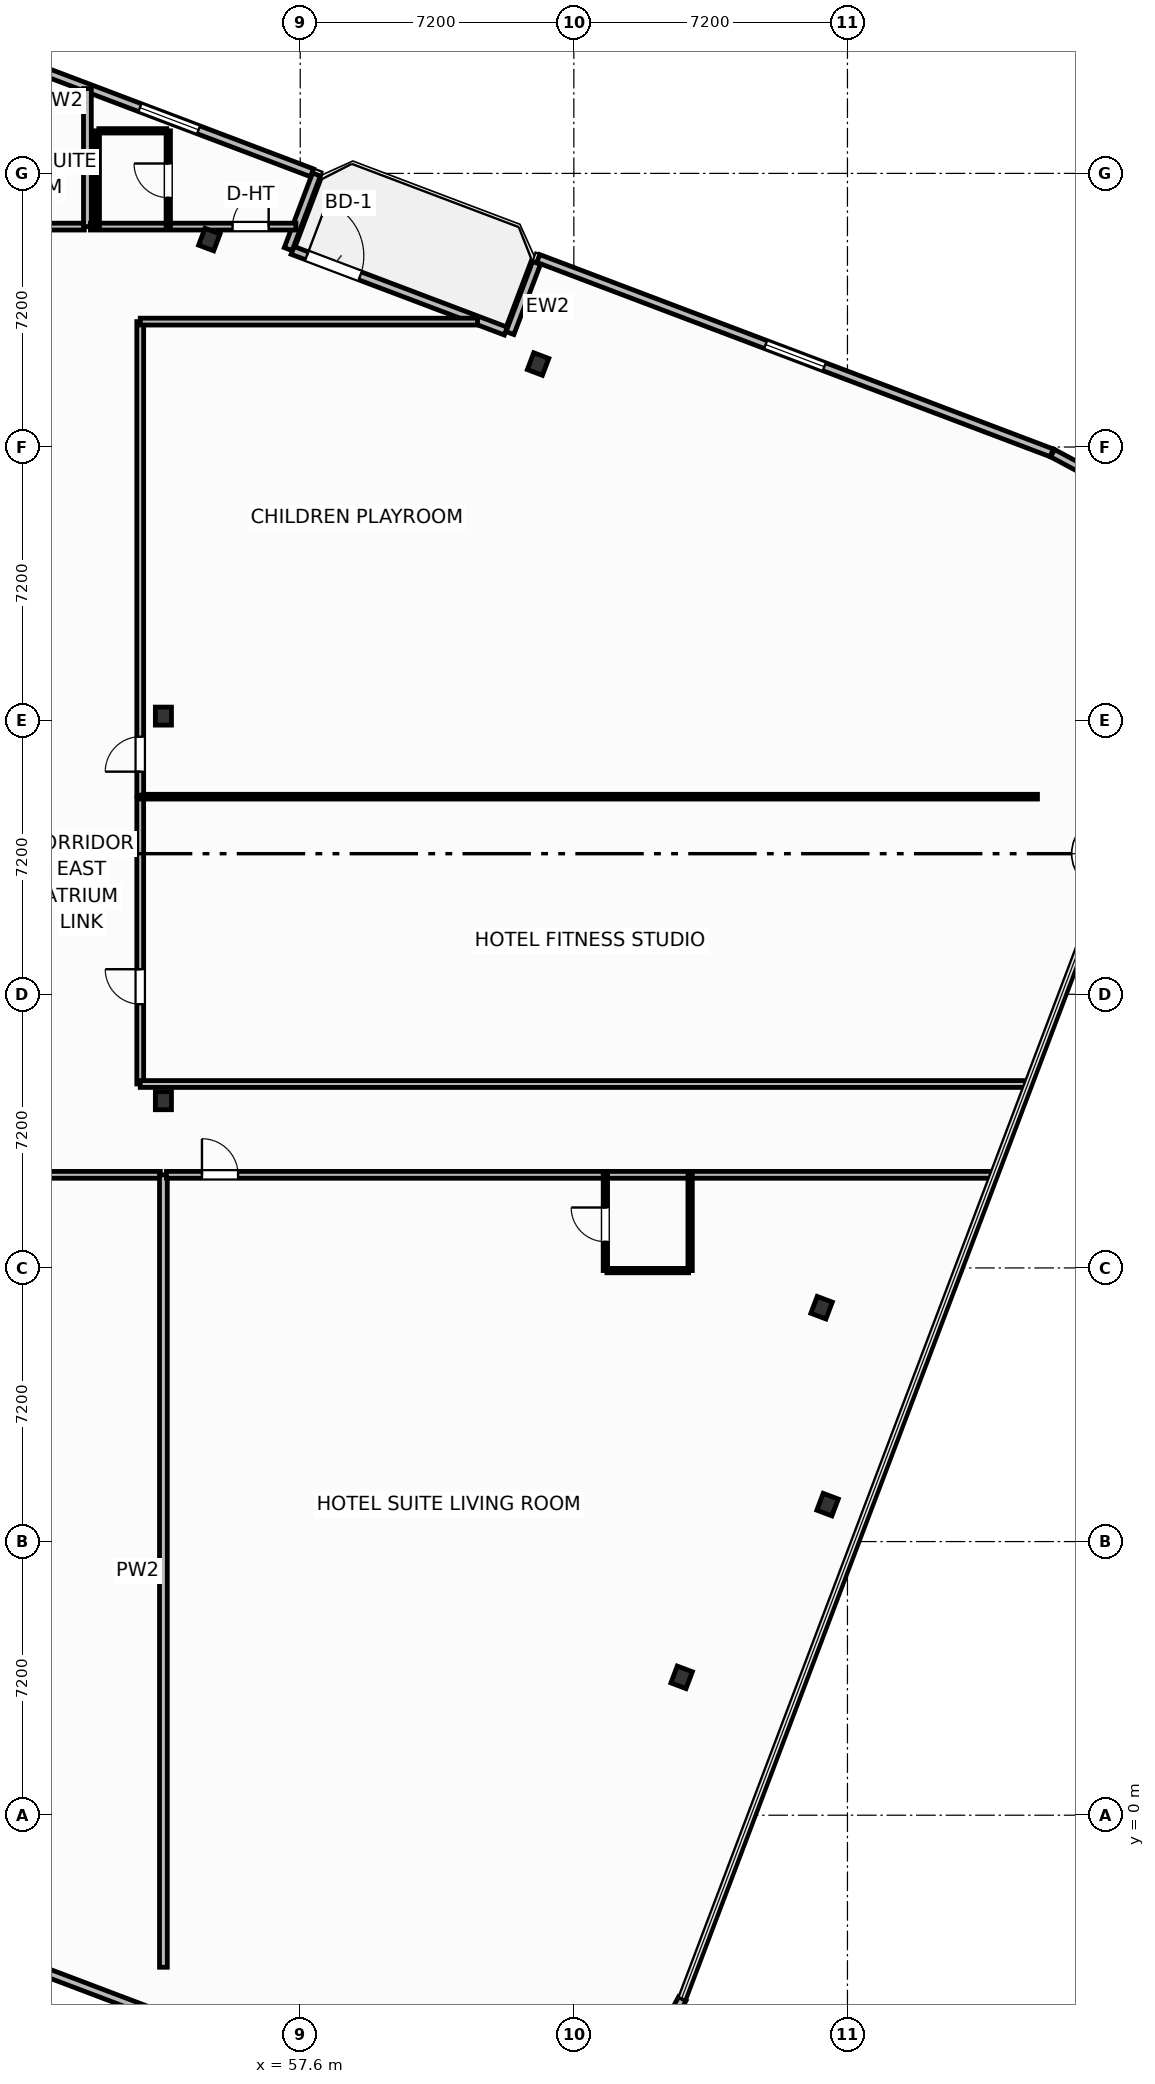
"""IFC4 building model, lengths in metres.
Left out: names, types, materials, properties, quantities, classifications, styles, units other than length and angle.
Written with IfcOpenShell. Run it as: python <this file> out.ifc"""

import sys

from ifc_helpers import new_model, si_unit, direction, frame, frame_2d, origin, origin_2d, place, context, subcontext, project, spatial, rectangle, i_section, extrude, element, fill, save


model = new_model("IFC4")
c1 = context("Model", 3, precision=1e-05, world=origin(), true_north=direction((0.0, 1.0)))
c2 = subcontext(c1, "Body", "Model", "MODEL_VIEW")
j1 = project(units=[si_unit("LENGTHUNIT", "METRE"), si_unit("PLANEANGLEUNIT", "RADIAN")], contexts=[c1])
p1 = place(None, origin())
s1 = spatial("IfcSite", under=j1, at=p1, CompositionType="ELEMENT")
p2 = place(p1, origin())
s2 = spatial("IfcBuilding", under=s1, at=p2, CompositionType="ELEMENT")
p3 = place(p2, frame((0.0, 0.0, 102.1)))
s3 = spatial("IfcBuildingStorey", under=s2, at=p3, CompositionType="ELEMENT", Elevation=102.1)
for number, where, z_axis, x_axis in (
    (1, (54.0, 18.8, 0.0), (0.0, 0.0, 1.0), (1.0, 0.0, 0.0)),
    (2, (54.0, 28.92, 0.0), (0.0, 0.0, 1.0), (1.0, 0.0, 0.0)),
    (3, (67.637, 3.628, 0.0), (0.0, 0.0, 1.0), (0.935, -0.354, 0.0)),
    (4, (71.477, 8.173, 0.0), (0.0, 0.0, 1.0), (0.935, -0.354, 0.0)),
    (5, (71.319, 13.354, 0.0), (0.0, 0.0, 1.0), (0.935, -0.354, 0.0)),
    (6, (63.859, 38.184, 0.0), (0.0, 0.0, 1.0), (0.935, -0.354, 0.0)),
    (7, (55.208, 41.459, 0.0), (0.0, 0.0, 1.0), (0.935, -0.354, 0.0)),
):
    element("IfcColumn", number, at=place(p3, frame(where, z_axis=z_axis, x_axis=x_axis)), inside=s3, PredefinedType="COLUMN", context=c2, shape_type="SweptSolid", body=[
        extrude(i_section(OverallWidth=0.424, OverallDepth=0.474, WebThickness=0.048, FlangeThickness=0.077, FilletRadius=0.025, at=origin_2d()), origin(), (0.0, 0.0, 1.0), 3.7),
    ])
p4 = place(p3, frame((57.399, 41.175, 0.0), z_axis=(0.0, 0.0, 1.0), x_axis=(0.935227640088, -0.354046976001, 0.0)))
e8 = element("IfcWall", 8, at=p4, inside=s3, PredefinedType="SOLIDWALL", context=c2, shape_type="SweptSolid", body=[
    extrude(rectangle(XDim=6.0, YDim=0.22, at=frame_2d((3.0, 0.0))), origin(), (0.0, 0.0, 1.0), 2.73),
])
p5 = place(p4, frame((0.4, 0.0, 0.0)))
e9 = element("IfcOpeningElement", 9, at=p5, cuts=e8, PredefinedType="OPENING", context=c2, shape_type="SweptSolid", body=[
    extrude(rectangle(XDim=1.5, YDim=2.25, at=frame_2d((0.75, 1.125))), frame((0.0, 0.12, 0.0), z_axis=(0.0, -1.0, 0.0), x_axis=(1.0, 0.0, 0.0)), (0.0, 0.0, 1.0), 0.24),
])
p6 = place(p3, frame((47.424, -2.813, 0.0), z_axis=(0.0, 0.0, 1.0), x_axis=(0.935225962032, -0.354051408614, 0.0)))
e10 = element("IfcWall", 10, at=p6, inside=s3, PredefinedType="SOLIDWALL", context=c2, shape_type="SweptSolid", body=[
    extrude(rectangle(XDim=14.347, YDim=0.22, at=frame_2d((7.173, 0.0))), origin(), (0.0, 0.0, 1.0), 2.73),
])
p7 = place(p6, frame((6.348, 0.0, 0.8)))
e11 = element("IfcOpeningElement", 11, at=p7, cuts=e10, PredefinedType="OPENING", context=c2, shape_type="SweptSolid", body=[
    extrude(rectangle(XDim=1.65, YDim=1.65, at=frame_2d((0.825, 0.825))), frame((0.0, 0.12, 0.0), z_axis=(0.0, -1.0, 0.0), x_axis=(1.0, 0.0, 0.0)), (0.0, 0.0, 1.0), 0.24),
])
p8 = place(p3, frame((67.015, -6.019, 0.0), z_axis=(0.0, 0.0, 1.0), x_axis=(0.473077364598, 0.881020889142, 0.0)))
e12 = element("IfcWall", 12, at=p8, inside=s3, PredefinedType="SOLIDWALL", context=c2, shape_type="SweptSolid", body=[
    extrude(rectangle(XDim=1.353, YDim=0.22, at=frame_2d((0.677, 0.0))), origin(), (0.0, 0.0, 1.0), 2.73),
])
p9 = place(p3, frame((78.597, 35.194, 0.0), z_axis=(0.0, 0.0, 1.0), x_axis=(-0.880948732004, 0.473211719614, 0.0)))
e13 = element("IfcWall", 13, at=p9, inside=s3, PredefinedType="SOLIDWALL", context=c2, shape_type="SweptSolid", body=[
    extrude(rectangle(XDim=1.361, YDim=0.22, at=frame_2d((0.681, 0.0))), origin(), (0.0, 0.0, 1.0), 2.73),
])
p10 = place(p3, frame((77.375, 35.847, 0.0), z_axis=(0.0, 0.0, 1.0), x_axis=(-0.935222448475, 0.354060689526, 0.0)))
e14 = element("IfcWall", 14, at=p10, inside=s3, PredefinedType="SOLIDWALL", context=c2, shape_type="SweptSolid", body=[
    extrude(rectangle(XDim=14.447, YDim=0.22, at=frame_2d((7.224, 0.0))), origin(), (0.0, 0.0, 1.0), 2.73),
])
p11 = place(p10, frame((6.399, 0.0, 0.8)))
e15 = element("IfcOpeningElement", 15, at=p11, cuts=e14, PredefinedType="OPENING", context=c2, shape_type="SweptSolid", body=[
    extrude(rectangle(XDim=1.65, YDim=1.65, at=frame_2d((0.825, 0.825))), frame((0.0, 0.12, 0.0), z_axis=(0.0, -1.0, 0.0), x_axis=(1.0, 0.0, 0.0)), (0.0, 0.0, 1.0), 0.24),
])
p12 = place(p3, frame((63.819, 40.845, 0.0), z_axis=(0.0, 0.0, 1.0), x_axis=(-0.354128791944, -0.935196663123, 0.0)))
e16 = element("IfcWall", 16, at=p12, inside=s3, PredefinedType="SOLIDWALL", context=c2, shape_type="SweptSolid", body=[
    extrude(rectangle(XDim=1.975, YDim=0.22, at=frame_2d((0.988, 0.0))), origin(), (0.0, 0.0, 1.0), 2.73),
])
p13 = place(p3, frame((57.284, 41.208, 0.0), z_axis=(0.0, 0.0, 1.0), x_axis=(0.354128469405, 0.935196785258, 0.0)))
e17 = element("IfcWall", 17, at=p13, inside=s3, PredefinedType="SOLIDWALL", context=c2, shape_type="SweptSolid", body=[
    extrude(rectangle(XDim=2.1, YDim=0.22, at=frame_2d((1.05, 0.0))), origin(), (0.0, 0.0, 1.0), 2.73),
])
p14 = place(p3, frame((57.91, 43.216, 0.0), z_axis=(0.0, 0.0, 1.0), x_axis=(-0.935220736163, 0.354065212427, 0.0)))
e18 = element("IfcWall", 18, at=p14, inside=s3, PredefinedType="SOLIDWALL", context=c2, shape_type="SweptSolid", body=[
    extrude(rectangle(XDim=8.035, YDim=0.22, at=frame_2d((4.018, 0.0))), origin(), (0.0, 0.0, 1.0), 2.73),
])
p15 = place(p14, frame((3.192, 0.0, 0.8)))
e19 = element("IfcOpeningElement", 19, at=p15, cuts=e18, PredefinedType="OPENING", context=c2, shape_type="SweptSolid", body=[
    extrude(rectangle(XDim=1.65, YDim=1.65, at=frame_2d((0.825, 0.825))), frame((0.0, 0.12, 0.0), z_axis=(0.0, -1.0, 0.0), x_axis=(1.0, 0.0, 0.0)), (0.0, 0.0, 1.0), 0.24),
])
p16 = place(p3, frame((39.28, 16.85, 0.0), z_axis=(0.0, 0.0, 1.0), x_axis=(1.0, 0.0, 0.0)))
e20 = element("IfcWall", 20, at=p16, inside=s3, PredefinedType="PARTITIONING", context=c2, shape_type="SweptSolid", body=[
    extrude(rectangle(XDim=14.64, YDim=0.18, at=frame_2d((7.32, 0.0))), origin(), (0.0, 0.0, 1.0), 3.45),
])
p17 = place(p16, frame((3.322, 0.0, 0.0)))
e21 = element("IfcOpeningElement", 21, at=p17, cuts=e20, PredefinedType="OPENING", context=c2, shape_type="SweptSolid", body=[
    extrude(rectangle(XDim=0.95, YDim=2.15, at=frame_2d((0.475, 1.075))), frame((0.0, 0.1, 0.0), z_axis=(0.0, -1.0, 0.0), x_axis=(1.0, 0.0, 0.0)), (0.0, 0.0, 1.0), 0.2),
])
p18 = place(p3, frame((54.0, -4.0, 0.0), z_axis=(0.0, 0.0, 1.0), x_axis=(0.0, 1.0, 0.0)))
e22 = element("IfcWall", 22, at=p18, inside=s3, PredefinedType="PARTITIONING", context=c2, shape_type="SweptSolid", body=[
    extrude(rectangle(XDim=20.85, YDim=0.205, at=frame_2d((10.425, 0.0))), origin(), (0.0, 0.0, 1.0), 3.45),
])
p19 = place(p3, frame((54.08, 16.85, 0.0), z_axis=(0.0, 0.0, 1.0), x_axis=(1.0, 0.0, 0.0)))
e23 = element("IfcWall", 23, at=p19, inside=s3, PredefinedType="PARTITIONING", context=c2, shape_type="SweptSolid", body=[
    extrude(rectangle(XDim=21.722, YDim=0.18, at=frame_2d((10.861, 0.0))), origin(), (0.0, 0.0, 1.0), 2.58),
])
p20 = place(p19, frame((0.934, 0.0, 0.0)))
e24 = element("IfcOpeningElement", 24, at=p20, cuts=e23, PredefinedType="OPENING", context=c2, shape_type="SweptSolid", body=[
    extrude(rectangle(XDim=0.95, YDim=2.15, at=frame_2d((0.475, 1.075))), frame((0.0, 0.1, 0.0), z_axis=(0.0, -1.0, 0.0), x_axis=(1.0, 0.0, 0.0)), (0.0, 0.0, 1.0), 0.2),
])
p21 = place(p3, frame((65.67, 14.33, 0.0), z_axis=(0.0, 0.0, 1.0), x_axis=(1.0, 0.0, 0.0)))
e25 = element("IfcWall", 25, at=p21, inside=s3, PredefinedType="PARTITIONING", context=c2, shape_type="SweptSolid", body=[
    extrude(rectangle(XDim=2.15, YDim=0.115, at=frame_2d((1.075, 0.0))), origin(), (0.0, 0.0, 1.0), 2.58),
])
p22 = place(p3, frame((65.63, 14.33, 0.0), z_axis=(0.0, 0.0, 1.0), x_axis=(0.0, 1.0, 0.0)))
e26 = element("IfcWall", 26, at=p22, inside=s3, PredefinedType="PARTITIONING", context=c2, shape_type="SweptSolid", body=[
    extrude(rectangle(XDim=2.52, YDim=0.115, at=frame_2d((1.26, 0.0))), origin(), (0.0, 0.0, 1.0), 3.45),
])
p23 = place(p22, frame((0.76, 0.0, 0.0)))
e27 = element("IfcOpeningElement", 27, at=p23, cuts=e26, PredefinedType="OPENING", context=c2, shape_type="SweptSolid", body=[
    extrude(rectangle(XDim=0.9, YDim=2.05, at=frame_2d((0.45, 1.025))), frame((0.0, 0.067, 0.0), z_axis=(0.0, -1.0, 0.0), x_axis=(1.0, 0.0, 0.0)), (0.0, 0.0, 1.0), 0.135),
])
p24 = place(p3, frame((67.86, 14.33, 0.0), z_axis=(0.0, 0.0, 1.0), x_axis=(0.0, 1.0, 0.0)))
e28 = element("IfcWall", 28, at=p24, inside=s3, PredefinedType="PARTITIONING", context=c2, shape_type="SweptSolid", body=[
    extrude(rectangle(XDim=2.52, YDim=0.115, at=frame_2d((1.26, 0.0))), origin(), (0.0, 0.0, 1.0), 3.45),
])
p25 = place(p3, frame((42.08, 41.8, 0.0), z_axis=(0.0, 0.0, 1.0), x_axis=(1.0, 0.0, 0.0)))
e29 = element("IfcWall", 29, at=p25, inside=s3, PredefinedType="PARTITIONING", context=c2, shape_type="SweptSolid", body=[
    extrude(rectangle(XDim=9.84, YDim=0.18, at=frame_2d((4.92, 0.0))), origin(), (0.0, 0.0, 1.0), 3.45),
])
p26 = place(p25, frame((3.323, 0.0, 0.0)))
e30 = element("IfcOpeningElement", 30, at=p26, cuts=e29, PredefinedType="OPENING", context=c2, shape_type="SweptSolid", body=[
    extrude(rectangle(XDim=0.95, YDim=2.15, at=frame_2d((0.475, 1.075))), frame((0.0, 0.1, 0.0), z_axis=(0.0, -1.0, 0.0), x_axis=(1.0, 0.0, 0.0)), (0.0, 0.0, 1.0), 0.2),
])
p27 = place(p3, frame((52.0, 41.8, 0.0), z_axis=(0.0, 0.0, 1.0), x_axis=(0.0, 1.0, 0.0)))
e31 = element("IfcWall", 31, at=p27, inside=s3, PredefinedType="PARTITIONING", context=c2, shape_type="SweptSolid", body=[
    extrude(rectangle(XDim=3.632, YDim=0.205, at=frame_2d((1.816, 0.0))), origin(), (0.0, 0.0, 1.0), 3.45),
])
p28 = place(p3, frame((52.08, 41.8, 0.0), z_axis=(0.0, 0.0, 1.0), x_axis=(1.0, 0.0, 0.0)))
e32 = element("IfcWall", 32, at=p28, inside=s3, PredefinedType="PARTITIONING", context=c2, shape_type="SweptSolid", body=[
    extrude(rectangle(XDim=5.406, YDim=0.18, at=frame_2d((2.703, 0.0))), origin(), (0.0, 0.0, 1.0), 3.45),
])
p29 = place(p28, frame((3.74, 0.0, 0.0)))
e33 = element("IfcOpeningElement", 33, at=p29, cuts=e32, PredefinedType="OPENING", context=c2, shape_type="SweptSolid", body=[
    extrude(rectangle(XDim=0.95, YDim=2.15, at=frame_2d((0.475, 1.075))), frame((0.0, 0.1, 0.0), z_axis=(0.0, -1.0, 0.0), x_axis=(1.0, 0.0, 0.0)), (0.0, 0.0, 1.0), 0.2),
])
p30 = place(p3, frame((52.3, 44.32, 0.0), z_axis=(0.0, 0.0, 1.0), x_axis=(1.0, 0.0, 0.0)))
e34 = element("IfcWall", 34, at=p30, inside=s3, PredefinedType="PARTITIONING", context=c2, shape_type="SweptSolid", body=[
    extrude(rectangle(XDim=1.788, YDim=0.115, at=frame_2d((0.894, 0.0))), origin(), (0.0, 0.0, 1.0), 3.45),
])
p31 = place(p3, frame((54.128, 41.8, 0.0), z_axis=(0.0, 0.0, 1.0), x_axis=(0.0, 1.0, 0.0)))
e35 = element("IfcWall", 35, at=p31, inside=s3, PredefinedType="PARTITIONING", context=c2, shape_type="SweptSolid", body=[
    extrude(rectangle(XDim=2.52, YDim=0.115, at=frame_2d((1.26, 0.0))), origin(), (0.0, 0.0, 1.0), 3.45),
])
p32 = place(p31, frame((0.76, 0.0, 0.0)))
e36 = element("IfcOpeningElement", 36, at=p32, cuts=e35, PredefinedType="OPENING", context=c2, shape_type="SweptSolid", body=[
    extrude(rectangle(XDim=0.9, YDim=2.05, at=frame_2d((0.45, 1.025))), frame((0.0, 0.067, 0.0), z_axis=(0.0, -1.0, 0.0), x_axis=(1.0, 0.0, 0.0)), (0.0, 0.0, 1.0), 0.135),
])
p33 = place(p3, frame((52.26, 41.8, 0.0), z_axis=(0.0, 0.0, 1.0), x_axis=(0.0, 1.0, 0.0)))
e37 = element("IfcWall", 37, at=p33, inside=s3, PredefinedType="PARTITIONING", context=c2, shape_type="SweptSolid", body=[
    extrude(rectangle(XDim=2.52, YDim=0.115, at=frame_2d((1.26, 0.0))), origin(), (0.0, 0.0, 1.0), 3.45),
])
p34 = place(p3, frame((53.39, 19.24, 0.0), z_axis=(0.0, 0.0, 1.0), x_axis=(0.0, 1.0, 0.0)))
e38 = element("IfcWall", 38, at=p34, inside=s3, PredefinedType="PARTITIONING", context=c2, shape_type="SweptSolid", body=[
    extrude(rectangle(XDim=7.52, YDim=0.18, at=frame_2d((3.76, 0.0))), origin(), (0.0, 0.0, 1.0), 3.45),
])
p35 = place(p34, frame((2.1, 0.0, 0.0)))
e39 = element("IfcOpeningElement", 39, at=p35, cuts=e38, PredefinedType="OPENING", context=c2, shape_type="SweptSolid", body=[
    extrude(rectangle(XDim=0.92, YDim=2.05, at=frame_2d((0.46, 1.025))), frame((0.0, 0.1, 0.0), z_axis=(0.0, -1.0, 0.0), x_axis=(1.0, 0.0, 0.0)), (0.0, 0.0, 1.0), 0.2),
])
p36 = place(p3, frame((53.39, 26.8, 0.0), z_axis=(0.0, 0.0, 1.0), x_axis=(1.0, 0.0, 0.0)))
e40 = element("IfcWall", 40, at=p36, inside=s3, PredefinedType="PARTITIONING", context=c2, shape_type="SweptSolid", body=[
    extrude(rectangle(XDim=23.61, YDim=0.125, at=frame_2d((11.805, 0.0))), origin(), (0.0, 0.0, 1.0), 3.45),
])
p37 = place(p3, frame((53.39, 19.24, 0.0), z_axis=(0.0, 0.0, 1.0), x_axis=(1.0, 0.0, 0.0)))
e41 = element("IfcWall", 41, at=p37, inside=s3, PredefinedType="PARTITIONING", context=c2, shape_type="SweptSolid", body=[
    extrude(rectangle(XDim=23.317, YDim=0.18, at=frame_2d((11.658, 0.0))), origin(), (0.0, 0.0, 1.0), 3.45),
])
p38 = place(p3, frame((53.39, 26.84, 0.0), z_axis=(0.0, 0.0, 1.0), x_axis=(0.0, 1.0, 0.0)))
e42 = element("IfcWall", 42, at=p38, inside=s3, PredefinedType="PARTITIONING", context=c2, shape_type="SweptSolid", body=[
    extrude(rectangle(XDim=12.46, YDim=0.18, at=frame_2d((6.23, 0.0))), origin(), (0.0, 0.0, 1.0), 3.45),
])
p39 = place(p38, frame((0.618, 0.0, 0.0)))
e43 = element("IfcOpeningElement", 43, at=p39, cuts=e42, PredefinedType="OPENING", context=c2, shape_type="SweptSolid", body=[
    extrude(rectangle(XDim=0.92, YDim=2.05, at=frame_2d((0.46, 1.025))), frame((0.0, 0.1, 0.0), z_axis=(0.0, -1.0, 0.0), x_axis=(1.0, 0.0, 0.0)), (0.0, 0.0, 1.0), 0.2),
])
p40 = place(p3, frame((53.39, 39.3, 0.0), z_axis=(0.0, 0.0, 1.0), x_axis=(1.0, 0.0, 0.0)))
e44 = element("IfcWall", 44, at=p40, inside=s3, PredefinedType="PARTITIONING", context=c2, shape_type="SweptSolid", body=[
    extrude(rectangle(XDim=8.876, YDim=0.18, at=frame_2d((4.438, 0.0))), origin(), (0.0, 0.0, 1.0), 3.45),
])
p41 = place(p5, origin())
e45 = element("IfcDoor", 45, at=p41, inside=s3, OperationType="SINGLE_SWING_LEFT", PredefinedType="DOOR", context=c2, shape_type="SweptSolid", body=[
    extrude(rectangle(XDim=1.5, YDim=2.25, at=frame_2d((0.75, 1.125))), frame((0.0, 0.025, 0.0), z_axis=(0.0, -1.0, 0.0), x_axis=(1.0, 0.0, 0.0)), (0.0, 0.0, 1.0), 0.05),
])
fill(e9, e45)
p42 = place(p11, origin())
e46 = element("IfcWindow", 46, at=p42, inside=s3, PartitioningType="SINGLE_PANEL", PredefinedType="WINDOW", context=c2, shape_type="SweptSolid", body=[
    extrude(rectangle(XDim=1.65, YDim=1.65, at=frame_2d((0.825, 0.825))), frame((0.0, 0.03, 0.0), z_axis=(0.0, -1.0, 0.0), x_axis=(1.0, 0.0, 0.0)), (0.0, 0.0, 1.0), 0.06),
])
fill(e15, e46)
p43 = place(p15, origin())
e47 = element("IfcWindow", 47, at=p43, inside=s3, PartitioningType="SINGLE_PANEL", PredefinedType="WINDOW", context=c2, shape_type="SweptSolid", body=[
    extrude(rectangle(XDim=1.65, YDim=1.65, at=frame_2d((0.825, 0.825))), frame((0.0, 0.03, 0.0), z_axis=(0.0, -1.0, 0.0), x_axis=(1.0, 0.0, 0.0)), (0.0, 0.0, 1.0), 0.06),
])
fill(e19, e47)
p44 = place(p20, origin())
e48 = element("IfcDoor", 48, at=p44, inside=s3, OperationType="SINGLE_SWING_LEFT", PredefinedType="DOOR", context=c2, shape_type="SweptSolid", body=[
    extrude(rectangle(XDim=0.95, YDim=2.15, at=frame_2d((0.475, 1.075))), frame((0.0, 0.025, 0.0), z_axis=(0.0, -1.0, 0.0), x_axis=(1.0, 0.0, 0.0)), (0.0, 0.0, 1.0), 0.05),
])
fill(e24, e48)
p45 = place(p23, origin())
e49 = element("IfcDoor", 49, at=p45, inside=s3, OperationType="SINGLE_SWING_RIGHT", PredefinedType="DOOR", context=c2, shape_type="SweptSolid", body=[
    extrude(rectangle(XDim=0.9, YDim=2.05, at=frame_2d((0.45, 1.025))), frame((0.0, 0.025, 0.0), z_axis=(0.0, -1.0, 0.0), x_axis=(1.0, 0.0, 0.0)), (0.0, 0.0, 1.0), 0.05),
])
fill(e27, e49)
p46 = place(p29, origin())
e50 = element("IfcDoor", 50, at=p46, inside=s3, OperationType="SINGLE_SWING_RIGHT", PredefinedType="DOOR", context=c2, shape_type="SweptSolid", body=[
    extrude(rectangle(XDim=0.95, YDim=2.15, at=frame_2d((0.475, 1.075))), frame((0.0, 0.025, 0.0), z_axis=(0.0, -1.0, 0.0), x_axis=(1.0, 0.0, 0.0)), (0.0, 0.0, 1.0), 0.05),
])
fill(e33, e50)
p47 = place(p32, origin())
e51 = element("IfcDoor", 51, at=p47, inside=s3, OperationType="SINGLE_SWING_RIGHT", PredefinedType="DOOR", context=c2, shape_type="SweptSolid", body=[
    extrude(rectangle(XDim=0.9, YDim=2.05, at=frame_2d((0.45, 1.025))), frame((0.0, 0.025, 0.0), z_axis=(0.0, -1.0, 0.0), x_axis=(1.0, 0.0, 0.0)), (0.0, 0.0, 1.0), 0.05),
])
fill(e36, e51)
p48 = place(p35, origin())
e52 = element("IfcDoor", 52, at=p48, inside=s3, OperationType="SINGLE_SWING_RIGHT", PredefinedType="DOOR", context=c2, shape_type="SweptSolid", body=[
    extrude(rectangle(XDim=0.92, YDim=2.05, at=frame_2d((0.46, 1.025))), frame((0.0, 0.025, 0.0), z_axis=(0.0, -1.0, 0.0), x_axis=(1.0, 0.0, 0.0)), (0.0, 0.0, 1.0), 0.05),
])
fill(e39, e52)
p49 = place(p39, origin())
e53 = element("IfcDoor", 53, at=p49, inside=s3, OperationType="SINGLE_SWING_LEFT", PredefinedType="DOOR", context=c2, shape_type="SweptSolid", body=[
    extrude(rectangle(XDim=0.92, YDim=2.05, at=frame_2d((0.46, 1.025))), frame((0.0, 0.025, 0.0), z_axis=(0.0, -1.0, 0.0), x_axis=(1.0, 0.0, 0.0)), (0.0, 0.0, 1.0), 0.05),
])
fill(e43, e53)
save(model, sys.argv[1])
